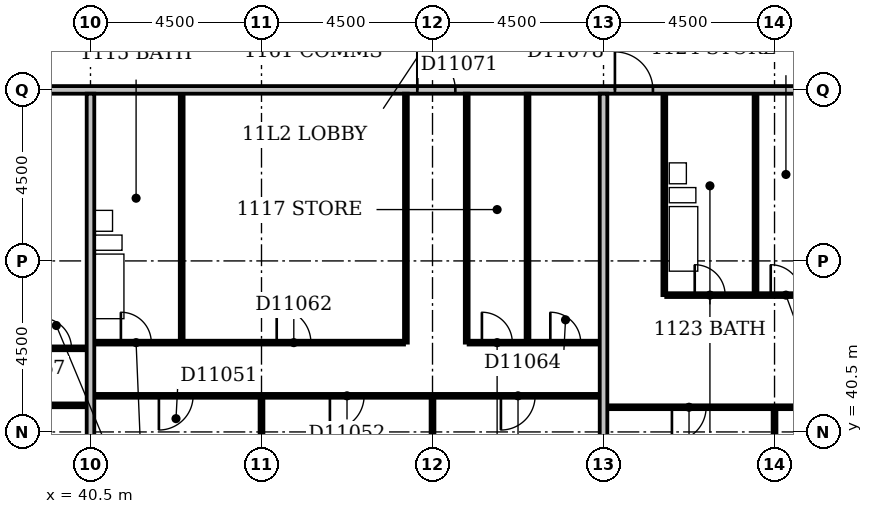
"""IFC4 building model, lengths in metres.
Left out: names, types, materials, properties, quantities, classifications, styles, units other than length and angle.
Written with IfcOpenShell. Run it as: python <this file> out.ifc"""

import sys

from ifc_helpers import new_model, si_unit, direction, frame, frame_2d, origin, place, context, subcontext, project, spatial, rectangle, extrude, element, fill, save


model = new_model("IFC4")
c1 = context("Model", 3, precision=1e-05, world=origin(), true_north=direction((0.0, 1.0)))
c2 = subcontext(c1, "Body", "Model", "MODEL_VIEW")
j1 = project(units=[si_unit("LENGTHUNIT", "METRE"), si_unit("PLANEANGLEUNIT", "RADIAN")], contexts=[c1])
p1 = place(None, origin())
s1 = spatial("IfcSite", under=j1, at=p1, CompositionType="ELEMENT")
p2 = place(p1, origin())
s2 = spatial("IfcBuilding", under=s1, at=p2, CompositionType="ELEMENT")
p3 = place(p2, frame((0.0, 0.0, 50.6)))
s3 = spatial("IfcBuildingStorey", under=s2, at=p3, CompositionType="ELEMENT", Elevation=50.6)
p4 = place(p3, frame((40.5, 36.6, 0.0), z_axis=(0.0, 0.0, 1.0), x_axis=(0.0, 1.0, 0.0)))
e1 = element("IfcWall", 1, at=p4, inside=s3, PredefinedType="PARTITIONING", context=c2, shape_type="SweptSolid", body=[
    extrude(rectangle(XDim=12.8, YDim=0.2, at=frame_2d((6.4, 0.0))), origin(), (0.0, 0.0, 1.0), 3.3),
])
p5 = place(p3, frame((45.0, 36.6, 0.0), z_axis=(0.0, 0.0, 1.0), x_axis=(0.0, 1.0, 0.0)))
e2 = element("IfcWall", 2, at=p5, inside=s3, PredefinedType="PARTITIONING", context=c2, shape_type="SweptSolid", body=[
    extrude(rectangle(XDim=4.8, YDim=0.1, at=frame_2d((2.4, 0.0))), origin(), (0.0, 0.0, 1.0), 2.6),
])
p6 = place(p3, frame((49.5, 36.6, 0.0), z_axis=(0.0, 0.0, 1.0), x_axis=(0.0, 1.0, 0.0)))
e3 = element("IfcWall", 3, at=p6, inside=s3, PredefinedType="PARTITIONING", context=c2, shape_type="SweptSolid", body=[
    extrude(rectangle(XDim=4.8, YDim=0.1, at=frame_2d((2.4, 0.0))), origin(), (0.0, 0.0, 1.0), 3.3),
])
p7 = place(p3, frame((54.0, 36.6, 0.0), z_axis=(0.0, 0.0, 1.0), x_axis=(0.0, 1.0, 0.0)))
e4 = element("IfcWall", 4, at=p7, inside=s3, PredefinedType="PARTITIONING", context=c2, shape_type="SweptSolid", body=[
    extrude(rectangle(XDim=12.8, YDim=0.2, at=frame_2d((6.4, 0.0))), origin(), (0.0, 0.0, 1.0), 2.6),
])
p8 = place(p3, frame((58.5, 36.6, 0.0), z_axis=(0.0, 0.0, 1.0), x_axis=(0.0, 1.0, 0.0)))
e5 = element("IfcWall", 5, at=p8, inside=s3, PredefinedType="PARTITIONING", context=c2, shape_type="SweptSolid", body=[
    extrude(rectangle(XDim=4.5, YDim=0.1, at=frame_2d((2.25, 0.0))), origin(), (0.0, 0.0, 1.0), 3.3),
])
p9 = place(p3, frame((54.1, 41.15, 0.0), z_axis=(0.0, 0.0, 1.0), x_axis=(1.0, 0.0, 0.0)))
e6 = element("IfcWall", 6, at=p9, inside=s3, PredefinedType="PARTITIONING", context=c2, shape_type="SweptSolid", body=[
    extrude(rectangle(XDim=14.0, YDim=0.1, at=frame_2d((7.0, 0.0))), origin(), (0.0, 0.0, 1.0), 3.3),
])
p10 = place(p9, frame((1.7, 0.0, 0.0)))
e7 = element("IfcOpeningElement", 7, at=p10, cuts=e6, PredefinedType="OPENING", context=c2, shape_type="SweptSolid", body=[
    extrude(rectangle(XDim=0.9, YDim=2.1, at=frame_2d((0.45, 1.05))), frame((0.0, 0.062, 0.0), z_axis=(0.0, -1.0, 0.0), x_axis=(1.0, 0.0, 0.0)), (0.0, 0.0, 1.0), 0.124),
])
p11 = place(p9, frame((6.2, 0.0, 0.0)))
e8 = element("IfcOpeningElement", 8, at=p11, cuts=e6, PredefinedType="OPENING", context=c2, shape_type="SweptSolid", body=[
    extrude(rectangle(XDim=0.9, YDim=2.1, at=frame_2d((0.45, 1.05))), frame((0.0, 0.062, 0.0), z_axis=(0.0, -1.0, 0.0), x_axis=(1.0, 0.0, 0.0)), (0.0, 0.0, 1.0), 0.124),
])
p12 = place(p9, frame((10.7, 0.0, 0.0)))
e9 = element("IfcOpeningElement", 9, at=p12, cuts=e6, PredefinedType="OPENING", context=c2, shape_type="SweptSolid", body=[
    extrude(rectangle(XDim=0.9, YDim=2.1, at=frame_2d((0.45, 1.05))), frame((0.0, 0.062, 0.0), z_axis=(0.0, -1.0, 0.0), x_axis=(1.0, 0.0, 0.0)), (0.0, 0.0, 1.0), 0.124),
])
p13 = place(p3, frame((22.6, 41.2, 0.0), z_axis=(0.0, 0.0, 1.0), x_axis=(1.0, 0.0, 0.0)))
e10 = element("IfcWall", 10, at=p13, inside=s3, PredefinedType="PARTITIONING", context=c2, shape_type="SweptSolid", body=[
    extrude(rectangle(XDim=17.8, YDim=0.1, at=frame_2d((8.9, 0.0))), origin(), (0.0, 0.0, 1.0), 3.3),
])
p14 = place(p13, frame((1.7, 0.0, 0.0)))
e11 = element("IfcOpeningElement", 11, at=p14, cuts=e10, PredefinedType="OPENING", context=c2, shape_type="SweptSolid", body=[
    extrude(rectangle(XDim=0.9, YDim=2.1, at=frame_2d((0.45, 1.05))), frame((0.0, 0.062, 0.0), z_axis=(0.0, -1.0, 0.0), x_axis=(1.0, 0.0, 0.0)), (0.0, 0.0, 1.0), 0.124),
])
p15 = place(p13, frame((6.2, 0.0, 0.0)))
e12 = element("IfcOpeningElement", 12, at=p15, cuts=e10, PredefinedType="OPENING", context=c2, shape_type="SweptSolid", body=[
    extrude(rectangle(XDim=0.9, YDim=2.1, at=frame_2d((0.45, 1.05))), frame((0.0, 0.062, 0.0), z_axis=(0.0, -1.0, 0.0), x_axis=(1.0, 0.0, 0.0)), (0.0, 0.0, 1.0), 0.124),
])
p16 = place(p13, frame((11.85, 0.0, 0.0)))
e13 = element("IfcOpeningElement", 13, at=p16, cuts=e10, PredefinedType="OPENING", context=c2, shape_type="SweptSolid", body=[
    extrude(rectangle(XDim=0.9, YDim=2.1, at=frame_2d((0.45, 1.05))), frame((0.0, 0.062, 0.0), z_axis=(0.0, -1.0, 0.0), x_axis=(1.0, 0.0, 0.0)), (0.0, 0.0, 1.0), 0.124),
])
p17 = place(p13, frame((15.2, 0.0, 0.0)))
e14 = element("IfcOpeningElement", 14, at=p17, cuts=e10, PredefinedType="OPENING", context=c2, shape_type="SweptSolid", body=[
    extrude(rectangle(XDim=0.9, YDim=2.1, at=frame_2d((0.45, 1.05))), frame((0.0, 0.062, 0.0), z_axis=(0.0, -1.0, 0.0), x_axis=(1.0, 0.0, 0.0)), (0.0, 0.0, 1.0), 0.124),
])
p18 = place(p3, frame((40.6, 41.45, 0.0), z_axis=(0.0, 0.0, 1.0), x_axis=(1.0, 0.0, 0.0)))
e15 = element("IfcWall", 15, at=p18, inside=s3, PredefinedType="PARTITIONING", context=c2, shape_type="SweptSolid", body=[
    extrude(rectangle(XDim=13.3, YDim=0.1, at=frame_2d((6.65, 0.0))), origin(), (0.0, 0.0, 1.0), 3.3),
])
p19 = place(p18, frame((1.7, 0.0, 0.0)))
e16 = element("IfcOpeningElement", 16, at=p19, cuts=e15, PredefinedType="OPENING", context=c2, shape_type="SweptSolid", body=[
    extrude(rectangle(XDim=0.9, YDim=2.1, at=frame_2d((0.45, 1.05))), frame((0.0, 0.062, 0.0), z_axis=(0.0, -1.0, 0.0), x_axis=(1.0, 0.0, 0.0)), (0.0, 0.0, 1.0), 0.124),
])
p20 = place(p18, frame((6.2, 0.0, 0.0)))
e17 = element("IfcOpeningElement", 17, at=p20, cuts=e15, PredefinedType="OPENING", context=c2, shape_type="SweptSolid", body=[
    extrude(rectangle(XDim=0.9, YDim=2.1, at=frame_2d((0.45, 1.05))), frame((0.0, 0.062, 0.0), z_axis=(0.0, -1.0, 0.0), x_axis=(1.0, 0.0, 0.0)), (0.0, 0.0, 1.0), 0.124),
])
p21 = place(p18, frame((10.7, 0.0, 0.0)))
e18 = element("IfcOpeningElement", 18, at=p21, cuts=e15, PredefinedType="OPENING", context=c2, shape_type="SweptSolid", body=[
    extrude(rectangle(XDim=0.9, YDim=2.1, at=frame_2d((0.45, 1.05))), frame((0.0, 0.062, 0.0), z_axis=(0.0, -1.0, 0.0), x_axis=(1.0, 0.0, 0.0)), (0.0, 0.0, 1.0), 0.124),
])
p22 = place(p3, frame((26.55, 42.7, 0.0), z_axis=(0.0, 0.0, 1.0), x_axis=(1.0, 0.0, 0.0)))
e19 = element("IfcWall", 19, at=p22, inside=s3, PredefinedType="PARTITIONING", context=c2, shape_type="SweptSolid", body=[
    extrude(rectangle(XDim=13.85, YDim=0.1, at=frame_2d((6.925, 0.0))), origin(), (0.0, 0.0, 1.0), 3.3),
])
p23 = place(p22, frame((5.05, 0.0, 0.0)))
e20 = element("IfcOpeningElement", 20, at=p23, cuts=e19, PredefinedType="OPENING", context=c2, shape_type="SweptSolid", body=[
    extrude(rectangle(XDim=0.8, YDim=2.1, at=frame_2d((0.4, 1.05))), frame((0.0, 0.062, 0.0), z_axis=(0.0, -1.0, 0.0), x_axis=(1.0, 0.0, 0.0)), (0.0, 0.0, 1.0), 0.124),
])
p24 = place(p22, frame((1.7, 0.0, 0.0)))
e21 = element("IfcOpeningElement", 21, at=p24, cuts=e19, PredefinedType="OPENING", context=c2, shape_type="SweptSolid", body=[
    extrude(rectangle(XDim=0.9, YDim=2.1, at=frame_2d((0.45, 1.05))), frame((0.0, 0.062, 0.0), z_axis=(0.0, -1.0, 0.0), x_axis=(1.0, 0.0, 0.0)), (0.0, 0.0, 1.0), 0.124),
])
p25 = place(p22, frame((10.75, 0.0, 0.0)))
e22 = element("IfcOpeningElement", 22, at=p25, cuts=e19, PredefinedType="OPENING", context=c2, shape_type="SweptSolid", body=[
    extrude(rectangle(XDim=0.8, YDim=2.1, at=frame_2d((0.4, 1.05))), frame((0.0, 0.062, 0.0), z_axis=(0.0, -1.0, 0.0), x_axis=(1.0, 0.0, 0.0)), (0.0, 0.0, 1.0), 0.124),
])
p26 = place(p22, frame((6.95, 0.0, 0.0)))
e23 = element("IfcOpeningElement", 23, at=p26, cuts=e19, PredefinedType="OPENING", context=c2, shape_type="SweptSolid", body=[
    extrude(rectangle(XDim=0.8, YDim=2.1, at=frame_2d((0.4, 1.05))), frame((0.0, 0.062, 0.0), z_axis=(0.0, -1.0, 0.0), x_axis=(1.0, 0.0, 0.0)), (0.0, 0.0, 1.0), 0.124),
])
p27 = place(p22, frame((8.75, 0.0, 0.0)))
e24 = element("IfcOpeningElement", 24, at=p27, cuts=e19, PredefinedType="OPENING", context=c2, shape_type="SweptSolid", body=[
    extrude(rectangle(XDim=0.8, YDim=2.1, at=frame_2d((0.4, 1.05))), frame((0.0, 0.062, 0.0), z_axis=(0.0, -1.0, 0.0), x_axis=(1.0, 0.0, 0.0)), (0.0, 0.0, 1.0), 0.124),
])
p28 = place(p22, frame((12.65, 0.0, 0.0)))
e25 = element("IfcOpeningElement", 25, at=p28, cuts=e19, PredefinedType="OPENING", context=c2, shape_type="SweptSolid", body=[
    extrude(rectangle(XDim=0.8, YDim=2.1, at=frame_2d((0.4, 1.05))), frame((0.0, 0.062, 0.0), z_axis=(0.0, -1.0, 0.0), x_axis=(1.0, 0.0, 0.0)), (0.0, 0.0, 1.0), 0.124),
])
p29 = place(p3, frame((40.6, 42.85, 0.0), z_axis=(0.0, 0.0, 1.0), x_axis=(1.0, 0.0, 0.0)))
e26 = element("IfcWall", 26, at=p29, inside=s3, PredefinedType="PARTITIONING", context=c2, shape_type="SweptSolid", body=[
    extrude(rectangle(XDim=8.15, YDim=0.1, at=frame_2d((4.075, 0.0))), origin(), (0.0, 0.0, 1.0), 3.3),
])
p30 = place(p29, frame((0.7, 0.0, 0.0)))
e27 = element("IfcOpeningElement", 27, at=p30, cuts=e26, PredefinedType="OPENING", context=c2, shape_type="SweptSolid", body=[
    extrude(rectangle(XDim=0.8, YDim=2.1, at=frame_2d((0.4, 1.05))), frame((0.0, 0.062, 0.0), z_axis=(0.0, -1.0, 0.0), x_axis=(1.0, 0.0, 0.0)), (0.0, 0.0, 1.0), 0.124),
])
p31 = place(p29, frame((4.8, 0.0, 0.0)))
e28 = element("IfcOpeningElement", 28, at=p31, cuts=e26, PredefinedType="OPENING", context=c2, shape_type="SweptSolid", body=[
    extrude(rectangle(XDim=0.9, YDim=2.1, at=frame_2d((0.45, 1.05))), frame((0.0, 0.062, 0.0), z_axis=(0.0, -1.0, 0.0), x_axis=(1.0, 0.0, 0.0)), (0.0, 0.0, 1.0), 0.124),
])
for number, where, z_axis, x_axis in (
    (29, (48.8, 42.85, 0.0), (0.0, 0.0, 1.0), (0.0, 1.0, 0.0)),
    (30, (50.4, 42.85, 0.0), (0.0, 0.0, 1.0), (0.0, 1.0, 0.0)),
):
    element("IfcWall", number, at=place(p3, frame(where, z_axis=z_axis, x_axis=x_axis)), inside=s3, PredefinedType="PARTITIONING", context=c2, shape_type="SweptSolid", body=[
        extrude(rectangle(XDim=6.55, YDim=0.1, at=frame_2d((3.275, 0.0))), origin(), (0.0, 0.0, 1.0), 3.3),
    ])
p32 = place(p3, frame((50.45, 42.85, 0.0), z_axis=(0.0, 0.0, 1.0), x_axis=(1.0, 0.0, 0.0)))
e31 = element("IfcWall", 31, at=p32, inside=s3, PredefinedType="PARTITIONING", context=c2, shape_type="SweptSolid", body=[
    extrude(rectangle(XDim=3.45, YDim=0.1, at=frame_2d((1.725, 0.0))), origin(), (0.0, 0.0, 1.0), 3.3),
])
p33 = place(p32, frame((0.35, 0.0, 0.0)))
e32 = element("IfcOpeningElement", 32, at=p33, cuts=e31, PredefinedType="OPENING", context=c2, shape_type="SweptSolid", body=[
    extrude(rectangle(XDim=0.8, YDim=2.1, at=frame_2d((0.4, 1.05))), frame((0.0, 0.062, 0.0), z_axis=(0.0, -1.0, 0.0), x_axis=(1.0, 0.0, 0.0)), (0.0, 0.0, 1.0), 0.124),
])
p34 = place(p32, frame((2.15, 0.0, 0.0)))
e33 = element("IfcOpeningElement", 33, at=p34, cuts=e31, PredefinedType="OPENING", context=c2, shape_type="SweptSolid", body=[
    extrude(rectangle(XDim=0.8, YDim=2.1, at=frame_2d((0.4, 1.05))), frame((0.0, 0.062, 0.0), z_axis=(0.0, -1.0, 0.0), x_axis=(1.0, 0.0, 0.0)), (0.0, 0.0, 1.0), 0.124),
])
p35 = place(p3, frame((42.9, 42.9, 0.0), z_axis=(0.0, 0.0, 1.0), x_axis=(0.0, 1.0, 0.0)))
e34 = element("IfcWall", 34, at=p35, inside=s3, PredefinedType="PLUMBINGWALL", context=c2, shape_type="SweptSolid", body=[
    extrude(rectangle(XDim=6.5, YDim=0.1, at=frame_2d((3.25, 0.0))), origin(), (0.0, 0.0, 1.0), 3.3),
])
p36 = place(p3, frame((52.0, 42.9, 0.0), z_axis=(0.0, 0.0, 1.0), x_axis=(0.0, 1.0, 0.0)))
e35 = element("IfcWall", 35, at=p36, inside=s3, PredefinedType="PARTITIONING", context=c2, shape_type="SweptSolid", body=[
    extrude(rectangle(XDim=6.5, YDim=0.1, at=frame_2d((3.25, 0.0))), origin(), (0.0, 0.0, 1.0), 3.3),
])
p37 = place(p3, frame((55.6, 44.1, 0.0), z_axis=(0.0, 0.0, 1.0), x_axis=(0.0, 1.0, 0.0)))
e36 = element("IfcWall", 36, at=p37, inside=s3, PredefinedType="PLUMBINGWALL", context=c2, shape_type="SweptSolid", body=[
    extrude(rectangle(XDim=5.3, YDim=0.1, at=frame_2d((2.65, 0.0))), origin(), (0.0, 0.0, 1.0), 3.3),
])
p38 = place(p3, frame((55.65, 44.1, 0.0), z_axis=(0.0, 0.0, 1.0), x_axis=(1.0, 0.0, 0.0)))
e37 = element("IfcWall", 37, at=p38, inside=s3, PredefinedType="PARTITIONING", context=c2, shape_type="SweptSolid", body=[
    extrude(rectangle(XDim=12.45, YDim=0.1, at=frame_2d((6.225, 0.0))), origin(), (0.0, 0.0, 1.0), 3.3),
])
p39 = place(p38, frame((0.75, 0.0, 0.0)))
e38 = element("IfcOpeningElement", 38, at=p39, cuts=e37, PredefinedType="OPENING", context=c2, shape_type="SweptSolid", body=[
    extrude(rectangle(XDim=0.8, YDim=2.1, at=frame_2d((0.4, 1.05))), frame((0.0, 0.062, 0.0), z_axis=(0.0, -1.0, 0.0), x_axis=(1.0, 0.0, 0.0)), (0.0, 0.0, 1.0), 0.124),
])
p40 = place(p38, frame((9.45, 0.0, 0.0)))
e39 = element("IfcOpeningElement", 39, at=p40, cuts=e37, PredefinedType="OPENING", context=c2, shape_type="SweptSolid", body=[
    extrude(rectangle(XDim=0.9, YDim=2.1, at=frame_2d((0.45, 1.05))), frame((0.0, 0.062, 0.0), z_axis=(0.0, -1.0, 0.0), x_axis=(1.0, 0.0, 0.0)), (0.0, 0.0, 1.0), 0.124),
])
p41 = place(p38, frame((6.55, 0.0, 0.0)))
e40 = element("IfcOpeningElement", 40, at=p41, cuts=e37, PredefinedType="OPENING", context=c2, shape_type="SweptSolid", body=[
    extrude(rectangle(XDim=0.8, YDim=2.1, at=frame_2d((0.4, 1.05))), frame((0.0, 0.062, 0.0), z_axis=(0.0, -1.0, 0.0), x_axis=(1.0, 0.0, 0.0)), (0.0, 0.0, 1.0), 0.124),
])
p42 = place(p38, frame((2.75, 0.0, 0.0)))
e41 = element("IfcOpeningElement", 41, at=p42, cuts=e37, PredefinedType="OPENING", context=c2, shape_type="SweptSolid", body=[
    extrude(rectangle(XDim=0.8, YDim=2.1, at=frame_2d((0.4, 1.05))), frame((0.0, 0.062, 0.0), z_axis=(0.0, -1.0, 0.0), x_axis=(1.0, 0.0, 0.0)), (0.0, 0.0, 1.0), 0.124),
])
p43 = place(p38, frame((4.55, 0.0, 0.0)))
e42 = element("IfcOpeningElement", 42, at=p43, cuts=e37, PredefinedType="OPENING", context=c2, shape_type="SweptSolid", body=[
    extrude(rectangle(XDim=0.8, YDim=2.1, at=frame_2d((0.4, 1.05))), frame((0.0, 0.062, 0.0), z_axis=(0.0, -1.0, 0.0), x_axis=(1.0, 0.0, 0.0)), (0.0, 0.0, 1.0), 0.124),
])
p44 = place(p3, frame((58.0, 44.15, 0.0), z_axis=(0.0, 0.0, 1.0), x_axis=(0.0, 1.0, 0.0)))
e43 = element("IfcWall", 43, at=p44, inside=s3, PredefinedType="PLUMBINGWALL", context=c2, shape_type="SweptSolid", body=[
    extrude(rectangle(XDim=5.25, YDim=0.1, at=frame_2d((2.625, 0.0))), origin(), (0.0, 0.0, 1.0), 3.3),
])
p45 = place(p3, frame((9.1, 49.5, 0.0), z_axis=(0.0, 0.0, 1.0), x_axis=(1.0, 0.0, 0.0)))
e44 = element("IfcWall", 44, at=p45, inside=s3, PredefinedType="PARTITIONING", context=c2, shape_type="SweptSolid", body=[
    extrude(rectangle(XDim=57.8, YDim=0.2, at=frame_2d((28.9, 0.0))), origin(), (0.0, 0.0, 1.0), 3.3),
])
p46 = place(p45, frame((16.1, 0.0, 0.0)))
e45 = element("IfcOpeningElement", 45, at=p46, cuts=e44, PredefinedType="OPENING", context=c2, shape_type="SweptSolid", body=[
    extrude(rectangle(XDim=1.0, YDim=2.1, at=frame_2d((0.5, 1.05))), frame((0.0, 0.112, 0.0), z_axis=(0.0, -1.0, 0.0), x_axis=(1.0, 0.0, 0.0)), (0.0, 0.0, 1.0), 0.224),
])
p47 = place(p45, frame((40.0, 0.0, 0.0)))
e46 = element("IfcOpeningElement", 46, at=p47, cuts=e44, PredefinedType="OPENING", context=c2, shape_type="SweptSolid", body=[
    extrude(rectangle(XDim=1.0, YDim=2.1, at=frame_2d((0.5, 1.05))), frame((0.0, 0.112, 0.0), z_axis=(0.0, -1.0, 0.0), x_axis=(1.0, 0.0, 0.0)), (0.0, 0.0, 1.0), 0.224),
])
p48 = place(p45, frame((45.2, 0.0, 0.0)))
e47 = element("IfcOpeningElement", 47, at=p48, cuts=e44, PredefinedType="OPENING", context=c2, shape_type="SweptSolid", body=[
    extrude(rectangle(XDim=1.0, YDim=2.1, at=frame_2d((0.5, 1.05))), frame((0.0, 0.112, 0.0), z_axis=(0.0, -1.0, 0.0), x_axis=(1.0, 0.0, 0.0)), (0.0, 0.0, 1.0), 0.224),
])
p49 = place(p45, frame((3.9, 0.0, 0.0)))
e48 = element("IfcOpeningElement", 48, at=p49, cuts=e44, PredefinedType="OPENING", context=c2, shape_type="SweptSolid", body=[
    extrude(rectangle(XDim=0.9, YDim=2.1, at=frame_2d((0.45, 1.05))), frame((0.0, 0.112, 0.0), z_axis=(0.0, -1.0, 0.0), x_axis=(1.0, 0.0, 0.0)), (0.0, 0.0, 1.0), 0.224),
])
p50 = place(p10, frame((0.9, 0.0, 0.0), z_axis=(0.0, 0.0, 1.0), x_axis=(-1.0, 0.0, 0.0)))
e49 = element("IfcDoor", 49, at=p50, inside=s3, OperationType="SINGLE_SWING_RIGHT", PredefinedType="DOOR", context=c2, shape_type="SweptSolid", body=[
    extrude(rectangle(XDim=0.9, YDim=2.1, at=frame_2d((0.45, 1.05))), frame((0.0, 0.025, 0.0), z_axis=(0.0, -1.0, 0.0), x_axis=(1.0, 0.0, 0.0)), (0.0, 0.0, 1.0), 0.05),
])
fill(e7, e49)
p51 = place(p19, frame((0.9, 0.0, 0.0), z_axis=(0.0, 0.0, 1.0), x_axis=(-1.0, 0.0, 0.0)))
e50 = element("IfcDoor", 50, at=p51, inside=s3, OperationType="SINGLE_SWING_RIGHT", PredefinedType="DOOR", context=c2, shape_type="SweptSolid", body=[
    extrude(rectangle(XDim=0.9, YDim=2.1, at=frame_2d((0.45, 1.05))), frame((0.0, 0.025, 0.0), z_axis=(0.0, -1.0, 0.0), x_axis=(1.0, 0.0, 0.0)), (0.0, 0.0, 1.0), 0.05),
])
fill(e16, e50)
p52 = place(p20, frame((0.9, 0.0, 0.0), z_axis=(0.0, 0.0, 1.0), x_axis=(-1.0, 0.0, 0.0)))
e51 = element("IfcDoor", 51, at=p52, inside=s3, OperationType="SINGLE_SWING_RIGHT", PredefinedType="DOOR", context=c2, shape_type="SweptSolid", body=[
    extrude(rectangle(XDim=0.9, YDim=2.1, at=frame_2d((0.45, 1.05))), frame((0.0, 0.025, 0.0), z_axis=(0.0, -1.0, 0.0), x_axis=(1.0, 0.0, 0.0)), (0.0, 0.0, 1.0), 0.05),
])
fill(e17, e51)
p53 = place(p21, frame((0.9, 0.0, 0.0), z_axis=(0.0, 0.0, 1.0), x_axis=(-1.0, 0.0, 0.0)))
e52 = element("IfcDoor", 52, at=p53, inside=s3, OperationType="SINGLE_SWING_RIGHT", PredefinedType="DOOR", context=c2, shape_type="SweptSolid", body=[
    extrude(rectangle(XDim=0.9, YDim=2.1, at=frame_2d((0.45, 1.05))), frame((0.0, 0.025, 0.0), z_axis=(0.0, -1.0, 0.0), x_axis=(1.0, 0.0, 0.0)), (0.0, 0.0, 1.0), 0.05),
])
fill(e18, e52)
p54 = place(p28, origin())
e53 = element("IfcDoor", 53, at=p54, inside=s3, OperationType="SINGLE_SWING_LEFT", PredefinedType="DOOR", context=c2, shape_type="SweptSolid", body=[
    extrude(rectangle(XDim=0.8, YDim=2.1, at=frame_2d((0.4, 1.05))), frame((0.0, 0.025, 0.0), z_axis=(0.0, -1.0, 0.0), x_axis=(1.0, 0.0, 0.0)), (0.0, 0.0, 1.0), 0.05),
])
fill(e25, e53)
p55 = place(p30, origin())
e54 = element("IfcDoor", 54, at=p55, inside=s3, OperationType="SINGLE_SWING_LEFT", PredefinedType="DOOR", context=c2, shape_type="SweptSolid", body=[
    extrude(rectangle(XDim=0.8, YDim=2.1, at=frame_2d((0.4, 1.05))), frame((0.0, 0.025, 0.0), z_axis=(0.0, -1.0, 0.0), x_axis=(1.0, 0.0, 0.0)), (0.0, 0.0, 1.0), 0.05),
])
fill(e27, e54)
p56 = place(p31, origin())
e55 = element("IfcDoor", 55, at=p56, inside=s3, OperationType="SINGLE_SWING_LEFT", PredefinedType="DOOR", context=c2, shape_type="SweptSolid", body=[
    extrude(rectangle(XDim=0.9, YDim=2.1, at=frame_2d((0.45, 1.05))), frame((0.0, 0.025, 0.0), z_axis=(0.0, -1.0, 0.0), x_axis=(1.0, 0.0, 0.0)), (0.0, 0.0, 1.0), 0.05),
])
fill(e28, e55)
p57 = place(p33, origin())
e56 = element("IfcDoor", 56, at=p57, inside=s3, OperationType="SINGLE_SWING_LEFT", PredefinedType="DOOR", context=c2, shape_type="SweptSolid", body=[
    extrude(rectangle(XDim=0.8, YDim=2.1, at=frame_2d((0.4, 1.05))), frame((0.0, 0.025, 0.0), z_axis=(0.0, -1.0, 0.0), x_axis=(1.0, 0.0, 0.0)), (0.0, 0.0, 1.0), 0.05),
])
fill(e32, e56)
p58 = place(p34, origin())
e57 = element("IfcDoor", 57, at=p58, inside=s3, OperationType="SINGLE_SWING_LEFT", PredefinedType="DOOR", context=c2, shape_type="SweptSolid", body=[
    extrude(rectangle(XDim=0.8, YDim=2.1, at=frame_2d((0.4, 1.05))), frame((0.0, 0.025, 0.0), z_axis=(0.0, -1.0, 0.0), x_axis=(1.0, 0.0, 0.0)), (0.0, 0.0, 1.0), 0.05),
])
fill(e33, e57)
p59 = place(p39, origin())
e58 = element("IfcDoor", 58, at=p59, inside=s3, OperationType="SINGLE_SWING_LEFT", PredefinedType="DOOR", context=c2, shape_type="SweptSolid", body=[
    extrude(rectangle(XDim=0.8, YDim=2.1, at=frame_2d((0.4, 1.05))), frame((0.0, 0.025, 0.0), z_axis=(0.0, -1.0, 0.0), x_axis=(1.0, 0.0, 0.0)), (0.0, 0.0, 1.0), 0.05),
])
fill(e38, e58)
p60 = place(p42, origin())
e59 = element("IfcDoor", 59, at=p60, inside=s3, OperationType="SINGLE_SWING_LEFT", PredefinedType="DOOR", context=c2, shape_type="SweptSolid", body=[
    extrude(rectangle(XDim=0.8, YDim=2.1, at=frame_2d((0.4, 1.05))), frame((0.0, 0.025, 0.0), z_axis=(0.0, -1.0, 0.0), x_axis=(1.0, 0.0, 0.0)), (0.0, 0.0, 1.0), 0.05),
])
fill(e41, e59)
p61 = place(p47, origin())
e60 = element("IfcDoor", 60, at=p61, inside=s3, OperationType="SINGLE_SWING_LEFT", PredefinedType="DOOR", context=c2, shape_type="SweptSolid", body=[
    extrude(rectangle(XDim=1.0, YDim=2.1, at=frame_2d((0.5, 1.05))), frame((0.0, 0.025, 0.0), z_axis=(0.0, -1.0, 0.0), x_axis=(1.0, 0.0, 0.0)), (0.0, 0.0, 1.0), 0.05),
])
fill(e46, e60)
p62 = place(p48, origin())
e61 = element("IfcDoor", 61, at=p62, inside=s3, OperationType="SINGLE_SWING_LEFT", PredefinedType="DOOR", context=c2, shape_type="SweptSolid", body=[
    extrude(rectangle(XDim=1.0, YDim=2.1, at=frame_2d((0.5, 1.05))), frame((0.0, 0.025, 0.0), z_axis=(0.0, -1.0, 0.0), x_axis=(1.0, 0.0, 0.0)), (0.0, 0.0, 1.0), 0.05),
])
fill(e47, e61)
save(model, sys.argv[1])
